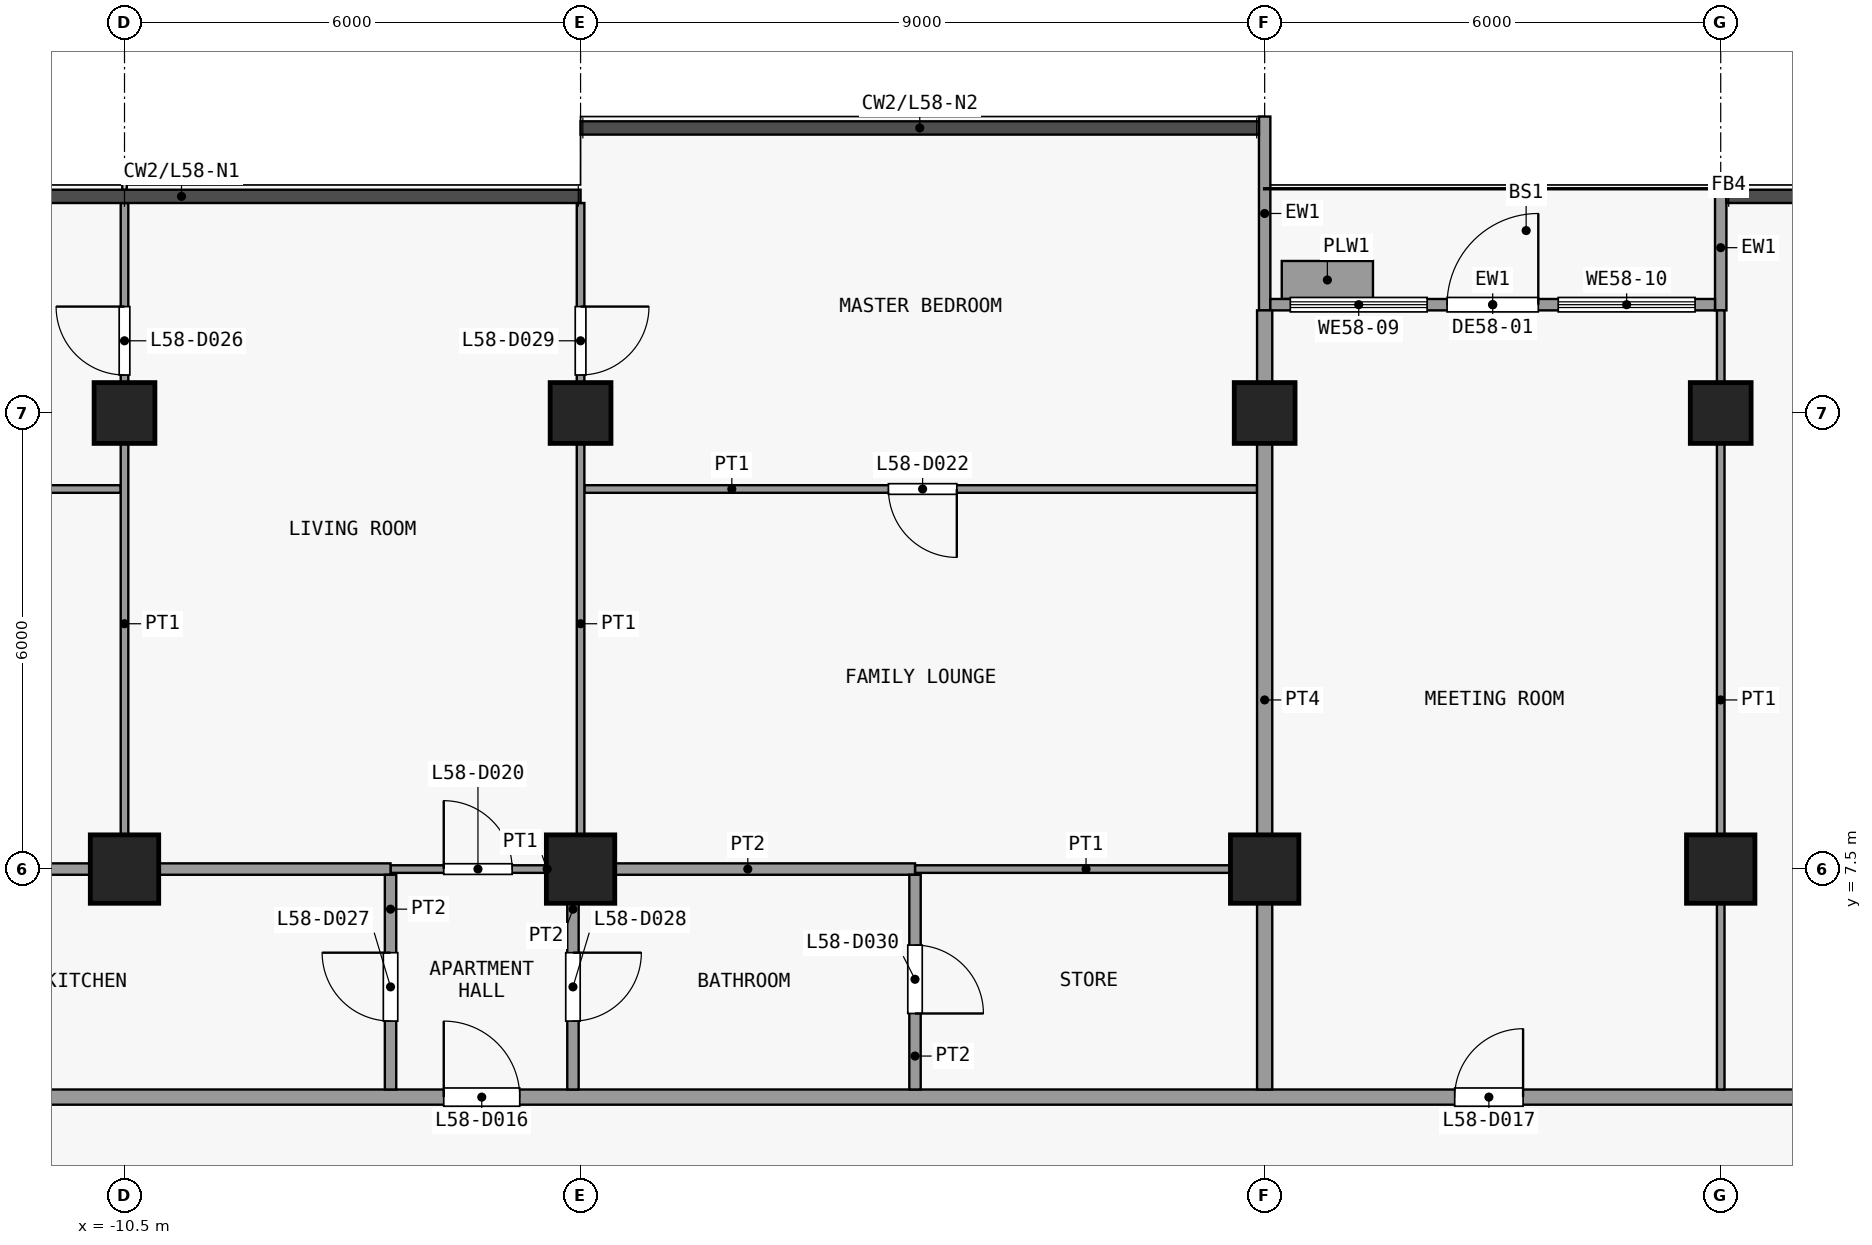
"""IFC4 building model, lengths in metres.
Left out: names, types, materials, properties, quantities, classifications, styles, units other than length and angle.
Written with IfcOpenShell. Run it as: python <this file> out.ifc"""

import sys

from ifc_helpers import new_model, si_unit, direction, frame, frame_2d, origin, origin_2d, place, context, subcontext, project, spatial, rectangle, extrude, element, fill, save


model = new_model("IFC4")
c1 = context("Model", 3, precision=1e-05, world=origin(), true_north=direction((0.0, 1.0)))
c2 = subcontext(c1, "Body", "Model", "MODEL_VIEW")
j1 = project(units=[si_unit("LENGTHUNIT", "METRE"), si_unit("PLANEANGLEUNIT", "RADIAN")], contexts=[c1])
p1 = place(None, origin())
s1 = spatial("IfcSite", under=j1, at=p1, CompositionType="ELEMENT")
p2 = place(p1, origin())
s2 = spatial("IfcBuilding", under=s1, at=p2, CompositionType="ELEMENT")
p3 = place(p2, frame((0.0, 0.0, 230.3)))
s3 = spatial("IfcBuildingStorey", under=s2, at=p3, CompositionType="ELEMENT", Elevation=230.3)
p4 = place(p3, frame((-10.5, 7.5, 0.0), z_axis=(0.0, 0.0, 1.0), x_axis=(1.0, 0.0, 0.0)))
e1 = element("IfcColumn", 1, at=p4, inside=s3, PredefinedType="COLUMN", context=c2, shape_type="SweptSolid", body=[
    extrude(rectangle(XDim=0.9, YDim=0.9, at=origin_2d()), origin(), (0.0, 0.0, 1.0), 3.6),
])
p5 = place(p3, frame((-10.5, 13.5, 0.0), z_axis=(0.0, 0.0, 1.0), x_axis=(1.0, 0.0, 0.0)))
e2 = element("IfcColumn", 2, at=p5, inside=s3, PredefinedType="COLUMN", context=c2, shape_type="SweptSolid", body=[
    extrude(rectangle(XDim=0.8, YDim=0.8, at=origin_2d()), origin(), (0.0, 0.0, 1.0), 3.6),
])
p6 = place(p3, frame((-4.5, 7.5, 0.0), z_axis=(0.0, 0.0, 1.0), x_axis=(1.0, 0.0, 0.0)))
e3 = element("IfcColumn", 3, at=p6, inside=s3, PredefinedType="COLUMN", context=c2, shape_type="SweptSolid", body=[
    extrude(rectangle(XDim=0.9, YDim=0.9, at=origin_2d()), origin(), (0.0, 0.0, 1.0), 3.6),
])
p7 = place(p3, frame((-4.5, 13.5, 0.0), z_axis=(0.0, 0.0, 1.0), x_axis=(1.0, 0.0, 0.0)))
e4 = element("IfcColumn", 4, at=p7, inside=s3, PredefinedType="COLUMN", context=c2, shape_type="SweptSolid", body=[
    extrude(rectangle(XDim=0.8, YDim=0.8, at=origin_2d()), origin(), (0.0, 0.0, 1.0), 3.6),
])
p8 = place(p3, frame((4.5, 7.5, 0.0), z_axis=(0.0, 0.0, 1.0), x_axis=(1.0, 0.0, 0.0)))
e5 = element("IfcColumn", 5, at=p8, inside=s3, PredefinedType="COLUMN", context=c2, shape_type="SweptSolid", body=[
    extrude(rectangle(XDim=0.9, YDim=0.9, at=origin_2d()), origin(), (0.0, 0.0, 1.0), 3.6),
])
p9 = place(p3, frame((4.5, 13.5, 0.0), z_axis=(0.0, 0.0, 1.0), x_axis=(1.0, 0.0, 0.0)))
e6 = element("IfcColumn", 6, at=p9, inside=s3, PredefinedType="COLUMN", context=c2, shape_type="SweptSolid", body=[
    extrude(rectangle(XDim=0.8, YDim=0.8, at=origin_2d()), origin(), (0.0, 0.0, 1.0), 3.6),
])
p10 = place(p3, frame((10.5, 7.5, 0.0), z_axis=(0.0, 0.0, 1.0), x_axis=(1.0, 0.0, 0.0)))
e7 = element("IfcColumn", 7, at=p10, inside=s3, PredefinedType="COLUMN", context=c2, shape_type="SweptSolid", body=[
    extrude(rectangle(XDim=0.9, YDim=0.9, at=origin_2d()), origin(), (0.0, 0.0, 1.0), 3.6),
])
p11 = place(p3, frame((10.5, 13.5, 0.0), z_axis=(0.0, 0.0, 1.0), x_axis=(1.0, 0.0, 0.0)))
e8 = element("IfcColumn", 8, at=p11, inside=s3, PredefinedType="COLUMN", context=c2, shape_type="SweptSolid", body=[
    extrude(rectangle(XDim=0.8, YDim=0.8, at=origin_2d()), origin(), (0.0, 0.0, 1.0), 3.6),
])
p12 = place(p3, frame((4.5, 14.85, 0.0), z_axis=(0.0, 0.0, 1.0), x_axis=(0.0, 1.0, 0.0)))
e9 = element("IfcWall", 9, at=p12, inside=s3, PredefinedType="SOLIDWALL", context=c2, shape_type="SweptSolid", body=[
    extrude(rectangle(XDim=2.55, YDim=0.15, at=frame_2d((1.275, 0.0))), origin(), (0.0, 0.0, 1.0), 3.3),
])
p13 = place(p3, frame((10.5, 14.85, 0.0), z_axis=(0.0, 0.0, 1.0), x_axis=(0.0, 1.0, 0.0)))
e10 = element("IfcWall", 10, at=p13, inside=s3, PredefinedType="SOLIDWALL", context=c2, shape_type="SweptSolid", body=[
    extrude(rectangle(XDim=1.65, YDim=0.15, at=frame_2d((0.825, 0.0))), origin(), (0.0, 0.0, 1.0), 3.3),
])
p14 = place(p3, frame((4.575, 14.925, 0.0), z_axis=(0.0, 0.0, 1.0), x_axis=(1.0, 0.0, 0.0)))
e11 = element("IfcWall", 11, at=p14, inside=s3, PredefinedType="SOLIDWALL", context=c2, shape_type="SweptSolid", body=[
    extrude(rectangle(XDim=5.85, YDim=0.15, at=frame_2d((2.925, 0.0))), origin(), (0.0, 0.0, 1.0), 3.3),
])
p15 = place(p14, frame((2.325, 0.0, 0.0)))
e12 = element("IfcOpeningElement", 12, at=p15, cuts=e11, PredefinedType="OPENING", context=c2, shape_type="SweptSolid", body=[
    extrude(rectangle(XDim=1.2, YDim=2.4, at=frame_2d((0.6, 1.2))), frame((0.0, 0.085, 0.0), z_axis=(0.0, -1.0, 0.0), x_axis=(1.0, 0.0, 0.0)), (0.0, 0.0, 1.0), 0.17),
])
p16 = place(p14, frame((0.262, 0.0, 0.9)))
e13 = element("IfcOpeningElement", 13, at=p16, cuts=e11, PredefinedType="OPENING", context=c2, shape_type="SweptSolid", body=[
    extrude(rectangle(XDim=1.8, YDim=2.1, at=frame_2d((0.9, 1.05))), frame((0.0, 0.085, 0.0), z_axis=(0.0, -1.0, 0.0), x_axis=(1.0, 0.0, 0.0)), (0.0, 0.0, 1.0), 0.17),
])
p17 = place(p14, frame((3.788, 0.0, 0.9)))
e14 = element("IfcOpeningElement", 14, at=p17, cuts=e11, PredefinedType="OPENING", context=c2, shape_type="SweptSolid", body=[
    extrude(rectangle(XDim=1.8, YDim=2.1, at=frame_2d((0.9, 1.05))), frame((0.0, 0.085, 0.0), z_axis=(0.0, -1.0, 0.0), x_axis=(1.0, 0.0, 0.0)), (0.0, 0.0, 1.0), 0.17),
])
p18 = place(p3, frame((4.725, 15.25, 0.0), z_axis=(0.0, 0.0, 1.0), x_axis=(1.0, 0.0, 0.0)))
e15 = element("IfcWall", 15, at=p18, inside=s3, PredefinedType="USERDEFINED", context=c2, shape_type="SweptSolid", body=[
    extrude(rectangle(XDim=1.2, YDim=0.5, at=frame_2d((0.6, 0.0))), origin(), (0.0, 0.0, 1.0), 0.9),
])
p19 = place(p3, frame((-20.25, 4.5, 0.0), z_axis=(0.0, 0.0, 1.0), x_axis=(1.0, 0.0, 0.0)))
e16 = element("IfcWall", 16, at=p19, inside=s3, PredefinedType="PARTITIONING", context=c2, shape_type="SweptSolid", body=[
    extrude(rectangle(XDim=39.6, YDim=0.2, at=frame_2d((19.8, 0.0))), origin(), (0.0, 0.0, 1.0), 3.3),
])
p20 = place(p19, frame((13.95, 0.0, 0.0)))
e17 = element("IfcOpeningElement", 17, at=p20, cuts=e16, PredefinedType="OPENING", context=c2, shape_type="SweptSolid", body=[
    extrude(rectangle(XDim=1.0, YDim=2.1, at=frame_2d((0.5, 1.05))), frame((0.0, 0.11, 0.0), z_axis=(0.0, -1.0, 0.0), x_axis=(1.0, 0.0, 0.0)), (0.0, 0.0, 1.0), 0.22),
])
p21 = place(p19, frame((27.25, 0.0, 0.0)))
e18 = element("IfcOpeningElement", 18, at=p21, cuts=e16, PredefinedType="OPENING", context=c2, shape_type="SweptSolid", body=[
    extrude(rectangle(XDim=0.9, YDim=2.1, at=frame_2d((0.45, 1.05))), frame((0.0, 0.11, 0.0), z_axis=(0.0, -1.0, 0.0), x_axis=(1.0, 0.0, 0.0)), (0.0, 0.0, 1.0), 0.22),
])
p22 = place(p19, frame((33.25, 0.0, 0.0)))
e19 = element("IfcOpeningElement", 19, at=p22, cuts=e16, PredefinedType="OPENING", context=c2, shape_type="SweptSolid", body=[
    extrude(rectangle(XDim=0.9, YDim=2.1, at=frame_2d((0.45, 1.05))), frame((0.0, 0.11, 0.0), z_axis=(0.0, -1.0, 0.0), x_axis=(1.0, 0.0, 0.0)), (0.0, 0.0, 1.0), 0.22),
])
p23 = place(p19, frame((37.75, 0.0, 0.0)))
e20 = element("IfcOpeningElement", 20, at=p23, cuts=e16, PredefinedType="OPENING", context=c2, shape_type="SweptSolid", body=[
    extrude(rectangle(XDim=0.9, YDim=2.1, at=frame_2d((0.45, 1.05))), frame((0.0, 0.11, 0.0), z_axis=(0.0, -1.0, 0.0), x_axis=(1.0, 0.0, 0.0)), (0.0, 0.0, 1.0), 0.22),
])
p24 = place(p3, frame((-7.0, 7.5, 0.0), z_axis=(0.0, 0.0, 1.0), x_axis=(1.0, 0.0, 0.0)))
e21 = element("IfcWall", 21, at=p24, inside=s3, PredefinedType="PARTITIONING", context=c2, shape_type="SweptSolid", body=[
    extrude(rectangle(XDim=2.4, YDim=0.1, at=frame_2d((1.2, 0.0))), origin(), (0.0, 0.0, 1.0), 3.3),
])
p25 = place(p24, frame((0.7, 0.0, 0.0)))
e22 = element("IfcOpeningElement", 22, at=p25, cuts=e21, PredefinedType="OPENING", context=c2, shape_type="SweptSolid", body=[
    extrude(rectangle(XDim=0.9, YDim=2.1, at=frame_2d((0.45, 1.05))), frame((0.0, 0.06, 0.0), z_axis=(0.0, -1.0, 0.0), x_axis=(1.0, 0.0, 0.0)), (0.0, 0.0, 1.0), 0.12),
])
p26 = place(p3, frame((-0.1, 7.5, 0.0), z_axis=(0.0, 0.0, 1.0), x_axis=(1.0, 0.0, 0.0)))
e23 = element("IfcWall", 23, at=p26, inside=s3, PredefinedType="PARTITIONING", context=c2, shape_type="SweptSolid", body=[
    extrude(rectangle(XDim=4.5, YDim=0.1, at=frame_2d((2.25, 0.0))), origin(), (0.0, 0.0, 1.0), 3.3),
])
p27 = place(p3, frame((-19.262, 7.5, 0.0), z_axis=(0.0, 0.0, 1.0), x_axis=(1.0, 0.0, 0.0)))
e24 = element("IfcWall", 24, at=p27, inside=s3, PredefinedType="PARTITIONING", context=c2, shape_type="SweptSolid", body=[
    extrude(rectangle(XDim=12.262, YDim=0.15, at=frame_2d((6.131, 0.0))), origin(), (0.0, 0.0, 1.0), 3.3),
])
p28 = place(p3, frame((-4.5, 7.5, 0.0), z_axis=(0.0, 0.0, 1.0), x_axis=(1.0, 0.0, 0.0)))
e25 = element("IfcWall", 25, at=p28, inside=s3, PredefinedType="PARTITIONING", context=c2, shape_type="SweptSolid", body=[
    extrude(rectangle(XDim=4.4, YDim=0.15, at=frame_2d((2.2, 0.0))), origin(), (0.0, 0.0, 1.0), 3.3),
])
p29 = place(p3, frame((-14.85, 12.5, 0.0), z_axis=(0.0, 0.0, 1.0), x_axis=(1.0, 0.0, 0.0)))
e26 = element("IfcWall", 26, at=p29, inside=s3, PredefinedType="PARTITIONING", context=c2, shape_type="SweptSolid", body=[
    extrude(rectangle(XDim=4.3, YDim=0.1, at=frame_2d((2.15, 0.0))), origin(), (0.0, 0.0, 1.0), 3.3),
])
p30 = place(p29, frame((1.7, 0.0, 0.0)))
e27 = element("IfcOpeningElement", 27, at=p30, cuts=e26, PredefinedType="OPENING", context=c2, shape_type="SweptSolid", body=[
    extrude(rectangle(XDim=0.9, YDim=2.1, at=frame_2d((0.45, 1.05))), frame((0.0, 0.06, 0.0), z_axis=(0.0, -1.0, 0.0), x_axis=(1.0, 0.0, 0.0)), (0.0, 0.0, 1.0), 0.12),
])
p31 = place(p3, frame((-4.45, 12.5, 0.0), z_axis=(0.0, 0.0, 1.0), x_axis=(1.0, 0.0, 0.0)))
e28 = element("IfcWall", 28, at=p31, inside=s3, PredefinedType="PARTITIONING", context=c2, shape_type="SweptSolid", body=[
    extrude(rectangle(XDim=8.85, YDim=0.1, at=frame_2d((4.425, 0.0))), origin(), (0.0, 0.0, 1.0), 3.3),
])
p32 = place(p31, frame((4.0, 0.0, 0.0)))
e29 = element("IfcOpeningElement", 29, at=p32, cuts=e28, PredefinedType="OPENING", context=c2, shape_type="SweptSolid", body=[
    extrude(rectangle(XDim=0.9, YDim=2.1, at=frame_2d((0.45, 1.05))), frame((0.0, 0.06, 0.0), z_axis=(0.0, -1.0, 0.0), x_axis=(1.0, 0.0, 0.0)), (0.0, 0.0, 1.0), 0.12),
])
p33 = place(p3, frame((-10.5, 7.575, 0.0), z_axis=(0.0, 0.0, 1.0), x_axis=(0.0, 1.0, 0.0)))
e30 = element("IfcWall", 30, at=p33, inside=s3, PredefinedType="PARTITIONING", context=c2, shape_type="SweptSolid", body=[
    extrude(rectangle(XDim=8.688, YDim=0.1, at=frame_2d((4.344, 0.0))), origin(), (0.0, 0.0, 1.0), 3.3),
])
p34 = place(p33, frame((6.425, 0.0, 0.0)))
e31 = element("IfcOpeningElement", 31, at=p34, cuts=e30, PredefinedType="OPENING", context=c2, shape_type="SweptSolid", body=[
    extrude(rectangle(XDim=0.9, YDim=2.1, at=frame_2d((0.45, 1.05))), frame((0.0, 0.06, 0.0), z_axis=(0.0, -1.0, 0.0), x_axis=(1.0, 0.0, 0.0)), (0.0, 0.0, 1.0), 0.12),
])
p35 = place(p3, frame((-7.0, 4.6, 0.0), z_axis=(0.0, 0.0, 1.0), x_axis=(0.0, 1.0, 0.0)))
e32 = element("IfcWall", 32, at=p35, inside=s3, PredefinedType="PARTITIONING", context=c2, shape_type="SweptSolid", body=[
    extrude(rectangle(XDim=2.825, YDim=0.15, at=frame_2d((1.413, 0.0))), origin(), (0.0, 0.0, 1.0), 3.3),
])
p36 = place(p35, frame((0.9, 0.0, 0.0)))
e33 = element("IfcOpeningElement", 33, at=p36, cuts=e32, PredefinedType="OPENING", context=c2, shape_type="SweptSolid", body=[
    extrude(rectangle(XDim=0.9, YDim=2.1, at=frame_2d((0.45, 1.05))), frame((0.0, 0.085, 0.0), z_axis=(0.0, -1.0, 0.0), x_axis=(1.0, 0.0, 0.0)), (0.0, 0.0, 1.0), 0.17),
])
p37 = place(p3, frame((-4.6, 4.6, 0.0), z_axis=(0.0, 0.0, 1.0), x_axis=(0.0, 1.0, 0.0)))
e34 = element("IfcWall", 34, at=p37, inside=s3, PredefinedType="PARTITIONING", context=c2, shape_type="SweptSolid", body=[
    extrude(rectangle(XDim=2.825, YDim=0.15, at=frame_2d((1.413, 0.0))), origin(), (0.0, 0.0, 1.0), 3.3),
])
p38 = place(p37, frame((0.9, 0.0, 0.0)))
e35 = element("IfcOpeningElement", 35, at=p38, cuts=e34, PredefinedType="OPENING", context=c2, shape_type="SweptSolid", body=[
    extrude(rectangle(XDim=0.9, YDim=2.1, at=frame_2d((0.45, 1.05))), frame((0.0, 0.085, 0.0), z_axis=(0.0, -1.0, 0.0), x_axis=(1.0, 0.0, 0.0)), (0.0, 0.0, 1.0), 0.17),
])
p39 = place(p3, frame((-4.5, 7.575, 0.0), z_axis=(0.0, 0.0, 1.0), x_axis=(0.0, 1.0, 0.0)))
e36 = element("IfcWall", 36, at=p39, inside=s3, PredefinedType="PARTITIONING", context=c2, shape_type="SweptSolid", body=[
    extrude(rectangle(XDim=8.688, YDim=0.1, at=frame_2d((4.344, 0.0))), origin(), (0.0, 0.0, 1.0), 3.3),
])
p40 = place(p39, frame((6.425, 0.0, 0.0)))
e37 = element("IfcOpeningElement", 37, at=p40, cuts=e36, PredefinedType="OPENING", context=c2, shape_type="SweptSolid", body=[
    extrude(rectangle(XDim=0.9, YDim=2.1, at=frame_2d((0.45, 1.05))), frame((0.0, 0.06, 0.0), z_axis=(0.0, -1.0, 0.0), x_axis=(1.0, 0.0, 0.0)), (0.0, 0.0, 1.0), 0.12),
])
p41 = place(p3, frame((-0.1, 4.6, 0.0), z_axis=(0.0, 0.0, 1.0), x_axis=(0.0, 1.0, 0.0)))
e38 = element("IfcWall", 38, at=p41, inside=s3, PredefinedType="PARTITIONING", context=c2, shape_type="SweptSolid", body=[
    extrude(rectangle(XDim=2.825, YDim=0.15, at=frame_2d((1.413, 0.0))), origin(), (0.0, 0.0, 1.0), 3.3),
])
p42 = place(p41, frame((1.0, 0.0, 0.0)))
e39 = element("IfcOpeningElement", 39, at=p42, cuts=e38, PredefinedType="OPENING", context=c2, shape_type="SweptSolid", body=[
    extrude(rectangle(XDim=0.9, YDim=2.1, at=frame_2d((0.45, 1.05))), frame((0.0, 0.085, 0.0), z_axis=(0.0, -1.0, 0.0), x_axis=(1.0, 0.0, 0.0)), (0.0, 0.0, 1.0), 0.17),
])
p43 = place(p3, frame((4.5, 4.6, 0.0), z_axis=(0.0, 0.0, 1.0), x_axis=(0.0, 1.0, 0.0)))
e40 = element("IfcWall", 40, at=p43, inside=s3, PredefinedType="PARTITIONING", context=c2, shape_type="SweptSolid", body=[
    extrude(rectangle(XDim=10.25, YDim=0.2, at=frame_2d((5.125, 0.0))), origin(), (0.0, 0.0, 1.0), 3.3),
])
p44 = place(p3, frame((10.5, 4.6, 0.0), z_axis=(0.0, 0.0, 1.0), x_axis=(0.0, 1.0, 0.0)))
e41 = element("IfcWall", 41, at=p44, inside=s3, PredefinedType="PARTITIONING", context=c2, shape_type="SweptSolid", body=[
    extrude(rectangle(XDim=10.25, YDim=0.1, at=frame_2d((5.125, 0.0))), origin(), (0.0, 0.0, 1.0), 3.3),
])
p45 = place(p15, origin())
e42 = element("IfcDoor", 42, at=p45, inside=s3, OperationType="SINGLE_SWING_RIGHT", PredefinedType="DOOR", context=c2, shape_type="SweptSolid", body=[
    extrude(rectangle(XDim=1.2, YDim=2.4, at=frame_2d((0.6, 1.2))), frame((0.0, 0.025, 0.0), z_axis=(0.0, -1.0, 0.0), x_axis=(1.0, 0.0, 0.0)), (0.0, 0.0, 1.0), 0.05),
])
fill(e12, e42)
p46 = place(p16, origin())
e43 = element("IfcWindow", 43, at=p46, inside=s3, PartitioningType="SINGLE_PANEL", PredefinedType="WINDOW", context=c2, shape_type="SweptSolid", body=[
    extrude(rectangle(XDim=1.8, YDim=2.1, at=frame_2d((0.9, 1.05))), frame((0.0, 0.03, 0.0), z_axis=(0.0, -1.0, 0.0), x_axis=(1.0, 0.0, 0.0)), (0.0, 0.0, 1.0), 0.06),
])
fill(e13, e43)
p47 = place(p17, origin())
e44 = element("IfcWindow", 44, at=p47, inside=s3, PartitioningType="SINGLE_PANEL", PredefinedType="WINDOW", context=c2, shape_type="SweptSolid", body=[
    extrude(rectangle(XDim=1.8, YDim=2.1, at=frame_2d((0.9, 1.05))), frame((0.0, 0.03, 0.0), z_axis=(0.0, -1.0, 0.0), x_axis=(1.0, 0.0, 0.0)), (0.0, 0.0, 1.0), 0.06),
])
fill(e14, e44)
p48 = place(p20, origin())
e45 = element("IfcDoor", 45, at=p48, inside=s3, OperationType="SINGLE_SWING_RIGHT", PredefinedType="DOOR", context=c2, shape_type="SweptSolid", body=[
    extrude(rectangle(XDim=1.0, YDim=2.1, at=frame_2d((0.5, 1.05))), frame((0.0, 0.025, 0.0), z_axis=(0.0, -1.0, 0.0), x_axis=(1.0, 0.0, 0.0)), (0.0, 0.0, 1.0), 0.05),
])
fill(e17, e45)
p49 = place(p21, origin())
e46 = element("IfcDoor", 46, at=p49, inside=s3, OperationType="SINGLE_SWING_LEFT", PredefinedType="DOOR", context=c2, shape_type="SweptSolid", body=[
    extrude(rectangle(XDim=0.9, YDim=2.1, at=frame_2d((0.45, 1.05))), frame((0.0, 0.025, 0.0), z_axis=(0.0, -1.0, 0.0), x_axis=(1.0, 0.0, 0.0)), (0.0, 0.0, 1.0), 0.05),
])
fill(e18, e46)
p50 = place(p25, origin())
e47 = element("IfcDoor", 47, at=p50, inside=s3, OperationType="SINGLE_SWING_RIGHT", PredefinedType="DOOR", context=c2, shape_type="SweptSolid", body=[
    extrude(rectangle(XDim=0.9, YDim=2.1, at=frame_2d((0.45, 1.05))), frame((0.0, 0.025, 0.0), z_axis=(0.0, -1.0, 0.0), x_axis=(1.0, 0.0, 0.0)), (0.0, 0.0, 1.0), 0.05),
])
fill(e22, e47)
p51 = place(p32, origin())
e48 = element("IfcDoor", 48, at=p51, inside=s3, OperationType="SINGLE_SWING_RIGHT", PredefinedType="DOOR", context=c2, shape_type="SweptSolid", body=[
    extrude(rectangle(XDim=0.9, YDim=2.1, at=frame_2d((0.45, 1.05))), frame((0.0, 0.025, 0.0), z_axis=(0.0, -1.0, 0.0), x_axis=(1.0, 0.0, 0.0)), (0.0, 0.0, 1.0), 0.05),
])
fill(e29, e48)
p52 = place(p34, origin())
e49 = element("IfcDoor", 49, at=p52, inside=s3, OperationType="SINGLE_SWING_LEFT", PredefinedType="DOOR", context=c2, shape_type="SweptSolid", body=[
    extrude(rectangle(XDim=0.9, YDim=2.1, at=frame_2d((0.45, 1.05))), frame((0.0, 0.025, 0.0), z_axis=(0.0, -1.0, 0.0), x_axis=(1.0, 0.0, 0.0)), (0.0, 0.0, 1.0), 0.05),
])
fill(e31, e49)
p53 = place(p36, origin())
e50 = element("IfcDoor", 50, at=p53, inside=s3, OperationType="SINGLE_SWING_LEFT", PredefinedType="DOOR", context=c2, shape_type="SweptSolid", body=[
    extrude(rectangle(XDim=0.9, YDim=2.1, at=frame_2d((0.45, 1.05))), frame((0.0, 0.025, 0.0), z_axis=(0.0, -1.0, 0.0), x_axis=(1.0, 0.0, 0.0)), (0.0, 0.0, 1.0), 0.05),
])
fill(e33, e50)
p54 = place(p38, origin())
e51 = element("IfcDoor", 51, at=p54, inside=s3, OperationType="SINGLE_SWING_RIGHT", PredefinedType="DOOR", context=c2, shape_type="SweptSolid", body=[
    extrude(rectangle(XDim=0.9, YDim=2.1, at=frame_2d((0.45, 1.05))), frame((0.0, 0.025, 0.0), z_axis=(0.0, -1.0, 0.0), x_axis=(1.0, 0.0, 0.0)), (0.0, 0.0, 1.0), 0.05),
])
fill(e35, e51)
p55 = place(p40, origin())
e52 = element("IfcDoor", 52, at=p55, inside=s3, OperationType="SINGLE_SWING_RIGHT", PredefinedType="DOOR", context=c2, shape_type="SweptSolid", body=[
    extrude(rectangle(XDim=0.9, YDim=2.1, at=frame_2d((0.45, 1.05))), frame((0.0, 0.025, 0.0), z_axis=(0.0, -1.0, 0.0), x_axis=(1.0, 0.0, 0.0)), (0.0, 0.0, 1.0), 0.05),
])
fill(e37, e52)
p56 = place(p42, origin())
e53 = element("IfcDoor", 53, at=p56, inside=s3, OperationType="SINGLE_SWING_LEFT", PredefinedType="DOOR", context=c2, shape_type="SweptSolid", body=[
    extrude(rectangle(XDim=0.9, YDim=2.1, at=frame_2d((0.45, 1.05))), frame((0.0, 0.025, 0.0), z_axis=(0.0, -1.0, 0.0), x_axis=(1.0, 0.0, 0.0)), (0.0, 0.0, 1.0), 0.05),
])
fill(e39, e53)
save(model, sys.argv[1])
